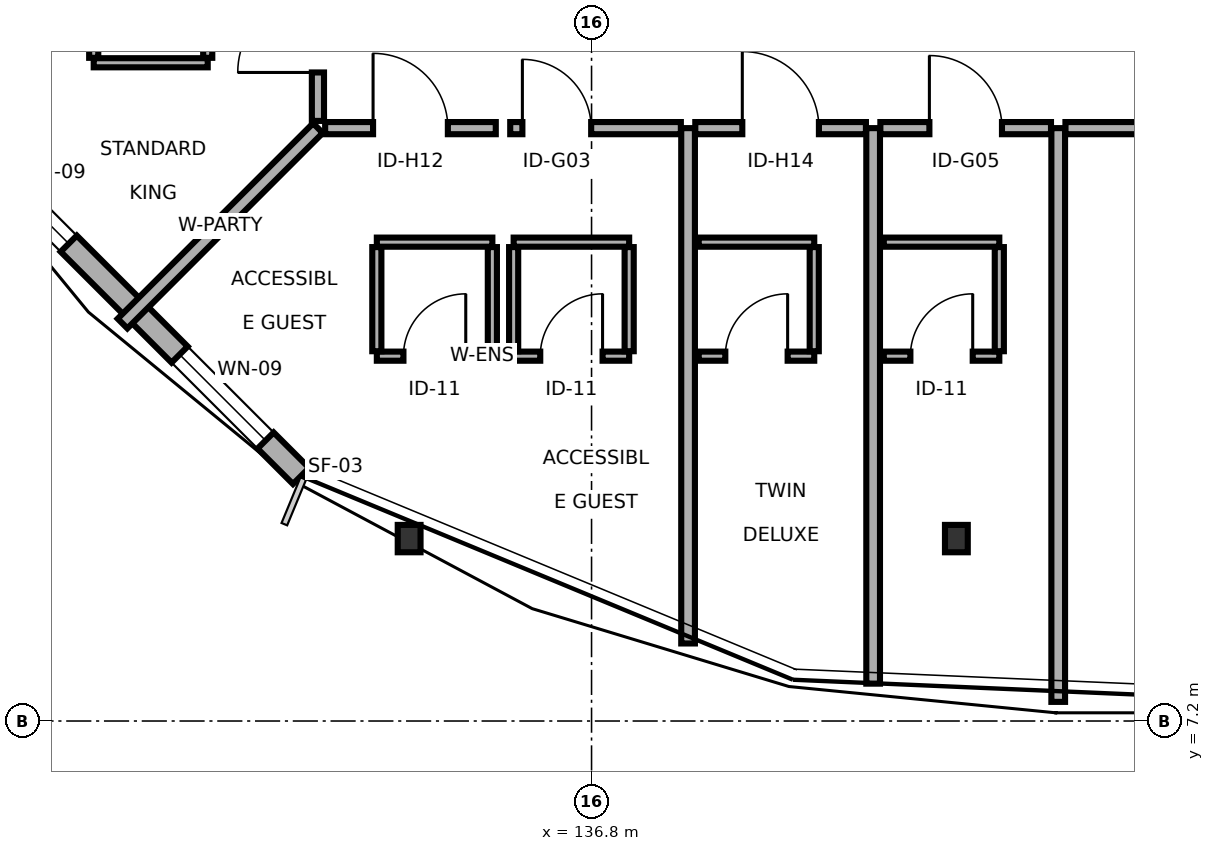
"""IFC4 building model, lengths in metres.
Left out: names, types, materials, properties, quantities, classifications, styles, units other than length and angle.
Written with IfcOpenShell. Run it as: python <this file> out.ifc"""

import sys

from ifc_helpers import new_model, si_unit, direction, frame, frame_2d, origin, origin_2d, place, context, subcontext, project, spatial, rectangle, i_section, extrude, element, fill, save


model = new_model("IFC4")
c1 = context("Model", 3, precision=1e-05, world=origin(), true_north=direction((0.0, 1.0)))
c2 = subcontext(c1, "Body", "Model", "MODEL_VIEW")
j1 = project(units=[si_unit("LENGTHUNIT", "METRE"), si_unit("PLANEANGLEUNIT", "RADIAN")], contexts=[c1])
p1 = place(None, origin())
s1 = spatial("IfcSite", under=j1, at=p1, CompositionType="ELEMENT")
p2 = place(p1, origin())
s2 = spatial("IfcBuilding", under=s1, at=p2, CompositionType="ELEMENT")
p3 = place(p2, frame((0.0, 0.0, 35.1)))
s3 = spatial("IfcBuildingStorey", under=s2, at=p3, CompositionType="ELEMENT", Elevation=35.1)
for number, where, z_axis, x_axis in (
    (1, (134.4, 9.6, 0.0), (0.0, 0.0, 1.0), (1.0, 0.0, 0.0)),
    (2, (141.6, 9.6, 0.0), (0.0, 0.0, 1.0), (1.0, 0.0, 0.0)),
):
    element("IfcColumn", number, at=place(p3, frame(where, z_axis=z_axis, x_axis=x_axis)), inside=s3, PredefinedType="COLUMN", context=c2, shape_type="SweptSolid", body=[
        extrude(i_section(OverallWidth=0.3, OverallDepth=0.36, WebThickness=0.012, FlangeThickness=0.022, FilletRadius=0.027, at=origin_2d()), origin(), (0.0, 0.0, 1.0), 3.4),
    ])
p4 = place(p3, frame((128.024, 15.378, 0.0), z_axis=(0.0, 0.0, 1.0), x_axis=(0.707124205549, -0.707089356394, 0.0)))
e3 = element("IfcWall", 3, at=p4, inside=s3, PredefinedType="SOLIDWALL", context=c2, shape_type="SweptSolid", body=[
    extrude(rectangle(XDim=7.006, YDim=0.3, at=frame_2d((3.503, 0.0))), origin(), (0.0, 0.0, 1.0), 3.165),
])
p5 = place(p4, frame((4.746, 0.0, 0.8)))
e4 = element("IfcOpeningElement", 4, at=p5, cuts=e3, PredefinedType="OPENING", context=c2, shape_type="SweptSolid", body=[
    extrude(rectangle(XDim=1.6, YDim=1.5, at=frame_2d((0.8, 0.75))), frame((0.0, 0.16, 0.0), z_axis=(0.0, -1.0, 0.0), x_axis=(1.0, 0.0, 0.0)), (0.0, 0.0, 1.0), 0.32),
])
p6 = place(p4, frame((1.083, 0.0, 0.8)))
e5 = element("IfcOpeningElement", 5, at=p6, cuts=e3, PredefinedType="OPENING", context=c2, shape_type="SweptSolid", body=[
    extrude(rectangle(XDim=1.6, YDim=1.5, at=frame_2d((0.8, 0.75))), frame((0.0, 0.16, 0.0), z_axis=(0.0, -1.0, 0.0), x_axis=(1.0, 0.0, 0.0)), (0.0, 0.0, 1.0), 0.32),
])
p7 = place(p3, frame((143.035, 15.0, 0.0), z_axis=(0.0, 0.0, 1.0), x_axis=(1.0, 0.0, 0.0)))
e6 = element("IfcWall", 6, at=p7, inside=s3, PredefinedType="PARTITIONING", context=c2, shape_type="SweptSolid", body=[
    extrude(rectangle(XDim=4.68, YDim=0.16, at=frame_2d((2.34, 0.0))), origin(), (0.0, 0.0, 1.0), 3.165),
])
p8 = place(p7, frame((1.59, 0.0, 0.0)))
e7 = element("IfcOpeningElement", 7, at=p8, cuts=e6, PredefinedType="OPENING", context=c2, shape_type="SweptSolid", body=[
    extrude(rectangle(XDim=1.5, YDim=2.25, at=frame_2d((0.75, 1.125))), frame((0.0, 0.09, 0.0), z_axis=(0.0, -1.0, 0.0), x_axis=(1.0, 0.0, 0.0)), (0.0, 0.0, 1.0), 0.18),
])
p9 = place(p3, frame((133.295, 15.0, 0.0), z_axis=(0.0, 0.0, 1.0), x_axis=(1.0, 0.0, 0.0)))
e8 = element("IfcWall", 8, at=p9, inside=s3, PredefinedType="PARTITIONING", context=c2, shape_type="SweptSolid", body=[
    extrude(rectangle(XDim=2.245, YDim=0.16, at=frame_2d((1.123, 0.0))), origin(), (0.0, 0.0, 1.0), 3.165),
])
p10 = place(p9, frame((0.631, 0.0, 0.0)))
e9 = element("IfcOpeningElement", 9, at=p10, cuts=e8, PredefinedType="OPENING", context=c2, shape_type="SweptSolid", body=[
    extrude(rectangle(XDim=0.984, YDim=2.07, at=frame_2d((0.492, 1.035))), frame((0.0, 0.09, 0.0), z_axis=(0.0, -1.0, 0.0), x_axis=(1.0, 0.0, 0.0)), (0.0, 0.0, 1.0), 0.18),
])
p11 = place(p3, frame((133.975, 12.0, 0.0), z_axis=(0.0, 0.0, 1.0), x_axis=(1.0, 0.0, 0.0)))
e10 = element("IfcWall", 10, at=p11, inside=s3, PredefinedType="PARTITIONING", context=c2, shape_type="SweptSolid", body=[
    extrude(rectangle(XDim=1.52, YDim=0.12, at=frame_2d((0.76, 0.0))), origin(), (0.0, 0.0, 1.0), 2.75),
])
p12 = place(p11, frame((0.35, 0.0, 0.0)))
e11 = element("IfcOpeningElement", 11, at=p12, cuts=e10, PredefinedType="OPENING", context=c2, shape_type="SweptSolid", body=[
    extrude(rectangle(XDim=0.82, YDim=2.08, at=frame_2d((0.41, 1.04))), frame((0.0, 0.07, 0.0), z_axis=(0.0, -1.0, 0.0), x_axis=(1.0, 0.0, 0.0)), (0.0, 0.0, 1.0), 0.14),
])
p13 = place(p3, frame((133.975, 13.5, 0.0), z_axis=(0.0, 0.0, 1.0), x_axis=(1.0, 0.0, 0.0)))
e12 = element("IfcWall", 12, at=p13, inside=s3, PredefinedType="PARTITIONING", context=c2, shape_type="SweptSolid", body=[
    extrude(rectangle(XDim=1.52, YDim=0.12, at=frame_2d((0.76, 0.0))), origin(), (0.0, 0.0, 1.0), 3.165),
])
p14 = place(p3, frame((133.975, 12.065, 0.0), z_axis=(0.0, 0.0, 1.0), x_axis=(0.0, 1.0, 0.0)))
e13 = element("IfcWall", 13, at=p14, inside=s3, PredefinedType="PARTITIONING", context=c2, shape_type="SweptSolid", body=[
    extrude(rectangle(XDim=1.37, YDim=0.12, at=frame_2d((0.685, 0.0))), origin(), (0.0, 0.0, 1.0), 3.165),
])
p15 = place(p3, frame((135.495, 12.065, 0.0), z_axis=(0.0, 0.0, 1.0), x_axis=(0.0, 1.0, 0.0)))
e14 = element("IfcWall", 14, at=p15, inside=s3, PredefinedType="PARTITIONING", context=c2, shape_type="SweptSolid", body=[
    extrude(rectangle(XDim=1.37, YDim=0.12, at=frame_2d((0.685, 0.0))), origin(), (0.0, 0.0, 1.0), 2.75),
])
p16 = place(p3, frame((133.2, 15.0, 0.0), z_axis=(0.0, 0.0, 1.0), x_axis=(-0.707106781187, -0.707106781187, 0.0)))
e15 = element("IfcWall", 15, at=p16, inside=s3, PredefinedType="PARTITIONING", context=c2, shape_type="SweptSolid", body=[
    extrude(rectangle(XDim=3.636, YDim=0.18, at=frame_2d((1.818, 0.0))), origin(), (0.0, 0.0, 1.0), 2.65),
])
p17 = place(p3, frame((135.73, 15.0, 0.0), z_axis=(0.0, 0.0, 1.0), x_axis=(1.0, 0.0, 0.0)))
e16 = element("IfcWall", 16, at=p17, inside=s3, PredefinedType="PARTITIONING", context=c2, shape_type="SweptSolid", body=[
    extrude(rectangle(XDim=2.245, YDim=0.16, at=frame_2d((1.123, 0.0))), origin(), (0.0, 0.0, 1.0), 2.75),
])
p18 = place(p17, frame((0.16, 0.0, 0.0)))
e17 = element("IfcOpeningElement", 17, at=p18, cuts=e16, PredefinedType="OPENING", context=c2, shape_type="SweptSolid", body=[
    extrude(rectangle(XDim=0.905, YDim=2.05, at=frame_2d((0.453, 1.025))), frame((0.0, 0.09, 0.0), z_axis=(0.0, -1.0, 0.0), x_axis=(1.0, 0.0, 0.0)), (0.0, 0.0, 1.0), 0.18),
])
p19 = place(p3, frame((135.775, 12.0, 0.0), z_axis=(0.0, 0.0, 1.0), x_axis=(1.0, 0.0, 0.0)))
e18 = element("IfcWall", 18, at=p19, inside=s3, PredefinedType="PARTITIONING", context=c2, shape_type="SweptSolid", body=[
    extrude(rectangle(XDim=1.52, YDim=0.12, at=frame_2d((0.76, 0.0))), origin(), (0.0, 0.0, 1.0), 3.165),
])
p20 = place(p19, frame((0.35, 0.0, 0.0)))
e19 = element("IfcOpeningElement", 19, at=p20, cuts=e18, PredefinedType="OPENING", context=c2, shape_type="SweptSolid", body=[
    extrude(rectangle(XDim=0.82, YDim=2.08, at=frame_2d((0.41, 1.04))), frame((0.0, 0.07, 0.0), z_axis=(0.0, -1.0, 0.0), x_axis=(1.0, 0.0, 0.0)), (0.0, 0.0, 1.0), 0.14),
])
p21 = place(p3, frame((135.775, 13.5, 0.0), z_axis=(0.0, 0.0, 1.0), x_axis=(1.0, 0.0, 0.0)))
e20 = element("IfcWall", 20, at=p21, inside=s3, PredefinedType="PARTITIONING", context=c2, shape_type="SweptSolid", body=[
    extrude(rectangle(XDim=1.52, YDim=0.12, at=frame_2d((0.76, 0.0))), origin(), (0.0, 0.0, 1.0), 2.75),
])
p22 = place(p3, frame((135.775, 12.065, 0.0), z_axis=(0.0, 0.0, 1.0), x_axis=(0.0, 1.0, 0.0)))
e21 = element("IfcWall", 21, at=p22, inside=s3, PredefinedType="PARTITIONING", context=c2, shape_type="SweptSolid", body=[
    extrude(rectangle(XDim=1.37, YDim=0.12, at=frame_2d((0.685, 0.0))), origin(), (0.0, 0.0, 1.0), 2.75),
])
p23 = place(p3, frame((137.295, 12.065, 0.0), z_axis=(0.0, 0.0, 1.0), x_axis=(0.0, 1.0, 0.0)))
e22 = element("IfcWall", 22, at=p23, inside=s3, PredefinedType="PARTITIONING", context=c2, shape_type="SweptSolid", body=[
    extrude(rectangle(XDim=1.37, YDim=0.12, at=frame_2d((0.685, 0.0))), origin(), (0.0, 0.0, 1.0), 3.165),
])
p24 = place(p3, frame((138.07, 8.22, 0.0), z_axis=(0.0, 0.0, 1.0), x_axis=(0.0, 1.0, 0.0)))
e23 = element("IfcWall", 23, at=p24, inside=s3, PredefinedType="PARTITIONING", context=c2, shape_type="SweptSolid", body=[
    extrude(rectangle(XDim=6.78, YDim=0.18, at=frame_2d((3.39, 0.0))), origin(), (0.0, 0.0, 1.0), 2.65),
])
p25 = place(p3, frame((138.165, 15.0, 0.0), z_axis=(0.0, 0.0, 1.0), x_axis=(1.0, 0.0, 0.0)))
e24 = element("IfcWall", 24, at=p25, inside=s3, PredefinedType="PARTITIONING", context=c2, shape_type="SweptSolid", body=[
    extrude(rectangle(XDim=2.245, YDim=0.16, at=frame_2d((1.123, 0.0))), origin(), (0.0, 0.0, 1.0), 3.165),
])
p26 = place(p25, frame((0.618, 0.0, 0.0)))
e25 = element("IfcOpeningElement", 25, at=p26, cuts=e24, PredefinedType="OPENING", context=c2, shape_type="SweptSolid", body=[
    extrude(rectangle(XDim=1.008, YDim=2.13, at=frame_2d((0.504, 1.065))), frame((0.0, 0.09, 0.0), z_axis=(0.0, -1.0, 0.0), x_axis=(1.0, 0.0, 0.0)), (0.0, 0.0, 1.0), 0.18),
])
p27 = place(p3, frame((138.21, 12.0, 0.0), z_axis=(0.0, 0.0, 1.0), x_axis=(1.0, 0.0, 0.0)))
e26 = element("IfcWall", 26, at=p27, inside=s3, PredefinedType="PARTITIONING", context=c2, shape_type="SweptSolid", body=[
    extrude(rectangle(XDim=1.52, YDim=0.12, at=frame_2d((0.76, 0.0))), origin(), (0.0, 0.0, 1.0), 3.165),
])
p28 = place(p27, frame((0.35, 0.0, 0.0)))
e27 = element("IfcOpeningElement", 27, at=p28, cuts=e26, PredefinedType="OPENING", context=c2, shape_type="SweptSolid", body=[
    extrude(rectangle(XDim=0.82, YDim=2.08, at=frame_2d((0.41, 1.04))), frame((0.0, 0.07, 0.0), z_axis=(0.0, -1.0, 0.0), x_axis=(1.0, 0.0, 0.0)), (0.0, 0.0, 1.0), 0.14),
])
p29 = place(p3, frame((138.21, 13.5, 0.0), z_axis=(0.0, 0.0, 1.0), x_axis=(1.0, 0.0, 0.0)))
e28 = element("IfcWall", 28, at=p29, inside=s3, PredefinedType="PARTITIONING", context=c2, shape_type="SweptSolid", body=[
    extrude(rectangle(XDim=1.52, YDim=0.12, at=frame_2d((0.76, 0.0))), origin(), (0.0, 0.0, 1.0), 3.165),
])
p30 = place(p3, frame((139.73, 12.065, 0.0), z_axis=(0.0, 0.0, 1.0), x_axis=(0.0, 1.0, 0.0)))
e29 = element("IfcWall", 29, at=p30, inside=s3, PredefinedType="PARTITIONING", context=c2, shape_type="SweptSolid", body=[
    extrude(rectangle(XDim=1.37, YDim=0.12, at=frame_2d((0.685, 0.0))), origin(), (0.0, 0.0, 1.0), 3.165),
])
p31 = place(p3, frame((140.505, 7.692, 0.0), z_axis=(0.0, 0.0, 1.0), x_axis=(0.0, 1.0, 0.0)))
e30 = element("IfcWall", 30, at=p31, inside=s3, PredefinedType="PARTITIONING", context=c2, shape_type="SweptSolid", body=[
    extrude(rectangle(XDim=7.308, YDim=0.18, at=frame_2d((3.654, 0.0))), origin(), (0.0, 0.0, 1.0), 2.65),
])
p32 = place(p3, frame((140.6, 15.0, 0.0), z_axis=(0.0, 0.0, 1.0), x_axis=(1.0, 0.0, 0.0)))
e31 = element("IfcWall", 31, at=p32, inside=s3, PredefinedType="PARTITIONING", context=c2, shape_type="SweptSolid", body=[
    extrude(rectangle(XDim=2.245, YDim=0.16, at=frame_2d((1.123, 0.0))), origin(), (0.0, 0.0, 1.0), 2.75),
])
p33 = place(p32, frame((0.645, 0.0, 0.0)))
e32 = element("IfcOpeningElement", 32, at=p33, cuts=e31, PredefinedType="OPENING", context=c2, shape_type="SweptSolid", body=[
    extrude(rectangle(XDim=0.955, YDim=2.05, at=frame_2d((0.478, 1.025))), frame((0.0, 0.09, 0.0), z_axis=(0.0, -1.0, 0.0), x_axis=(1.0, 0.0, 0.0)), (0.0, 0.0, 1.0), 0.18),
])
p34 = place(p3, frame((140.645, 12.0, 0.0), z_axis=(0.0, 0.0, 1.0), x_axis=(1.0, 0.0, 0.0)))
e33 = element("IfcWall", 33, at=p34, inside=s3, PredefinedType="PARTITIONING", context=c2, shape_type="SweptSolid", body=[
    extrude(rectangle(XDim=1.52, YDim=0.12, at=frame_2d((0.76, 0.0))), origin(), (0.0, 0.0, 1.0), 2.75),
])
p35 = place(p34, frame((0.35, 0.0, 0.0)))
e34 = element("IfcOpeningElement", 34, at=p35, cuts=e33, PredefinedType="OPENING", context=c2, shape_type="SweptSolid", body=[
    extrude(rectangle(XDim=0.82, YDim=2.08, at=frame_2d((0.41, 1.04))), frame((0.0, 0.07, 0.0), z_axis=(0.0, -1.0, 0.0), x_axis=(1.0, 0.0, 0.0)), (0.0, 0.0, 1.0), 0.14),
])
p36 = place(p3, frame((140.645, 13.5, 0.0), z_axis=(0.0, 0.0, 1.0), x_axis=(1.0, 0.0, 0.0)))
e35 = element("IfcWall", 35, at=p36, inside=s3, PredefinedType="PARTITIONING", context=c2, shape_type="SweptSolid", body=[
    extrude(rectangle(XDim=1.52, YDim=0.12, at=frame_2d((0.76, 0.0))), origin(), (0.0, 0.0, 1.0), 2.75),
])
p37 = place(p3, frame((142.165, 12.065, 0.0), z_axis=(0.0, 0.0, 1.0), x_axis=(0.0, 1.0, 0.0)))
e36 = element("IfcWall", 36, at=p37, inside=s3, PredefinedType="PARTITIONING", context=c2, shape_type="SweptSolid", body=[
    extrude(rectangle(XDim=1.37, YDim=0.12, at=frame_2d((0.685, 0.0))), origin(), (0.0, 0.0, 1.0), 3.165),
])
p38 = place(p3, frame((142.94, 7.452, 0.0), z_axis=(0.0, 0.0, 1.0), x_axis=(0.0, 1.0, 0.0)))
e37 = element("IfcWall", 37, at=p38, inside=s3, PredefinedType="PARTITIONING", context=c2, shape_type="SweptSolid", body=[
    extrude(rectangle(XDim=7.548, YDim=0.18, at=frame_2d((3.774, 0.0))), origin(), (0.0, 0.0, 1.0), 2.65),
])
p39 = place(p3, frame((133.2, 15.095, 0.0), z_axis=(0.0, 0.0, 1.0), x_axis=(0.0, 1.0, 0.0)))
e38 = element("IfcWall", 38, at=p39, inside=s3, PredefinedType="PARTITIONING", context=c2, shape_type="SweptSolid", body=[
    extrude(rectangle(XDim=2.33, YDim=0.16, at=frame_2d((1.165, 0.0))), origin(), (0.0, 0.0, 1.0), 2.75),
])
p40 = place(p39, frame((0.637, 0.0, 0.0)))
e39 = element("IfcOpeningElement", 39, at=p40, cuts=e38, PredefinedType="OPENING", context=c2, shape_type="SweptSolid", body=[
    extrude(rectangle(XDim=1.055, YDim=2.05, at=frame_2d((0.527, 1.025))), frame((0.0, 0.09, 0.0), z_axis=(0.0, -1.0, 0.0), x_axis=(1.0, 0.0, 0.0)), (0.0, 0.0, 1.0), 0.18),
])
p41 = place(p3, frame((130.25, 15.86, 0.0), z_axis=(0.0, 0.0, 1.0), x_axis=(1.0, 0.0, 0.0)))
e40 = element("IfcWall", 40, at=p41, inside=s3, PredefinedType="PARTITIONING", context=c2, shape_type="SweptSolid", body=[
    extrude(rectangle(XDim=1.5, YDim=0.12, at=frame_2d((0.75, 0.0))), origin(), (0.0, 0.0, 1.0), 3.165),
])
p42 = place(p3, frame((130.25, 15.925, 0.0), z_axis=(0.0, 0.0, 1.0), x_axis=(0.0, 1.0, 0.0)))
e41 = element("IfcWall", 41, at=p42, inside=s3, PredefinedType="PARTITIONING", context=c2, shape_type="SweptSolid", body=[
    extrude(rectangle(XDim=1.39, YDim=0.12, at=frame_2d((0.695, 0.0))), origin(), (0.0, 0.0, 1.0), 2.75),
])
p43 = place(p42, frame((0.285, 0.0, 0.0)))
e42 = element("IfcOpeningElement", 42, at=p43, cuts=e41, PredefinedType="OPENING", context=c2, shape_type="SweptSolid", body=[
    extrude(rectangle(XDim=0.82, YDim=2.08, at=frame_2d((0.41, 1.04))), frame((0.0, 0.07, 0.0), z_axis=(0.0, -1.0, 0.0), x_axis=(1.0, 0.0, 0.0)), (0.0, 0.0, 1.0), 0.14),
])
p44 = place(p3, frame((131.75, 15.925, 0.0), z_axis=(0.0, 0.0, 1.0), x_axis=(0.0, 1.0, 0.0)))
e43 = element("IfcWall", 43, at=p44, inside=s3, PredefinedType="PARTITIONING", context=c2, shape_type="SweptSolid", body=[
    extrude(rectangle(XDim=1.39, YDim=0.12, at=frame_2d((0.695, 0.0))), origin(), (0.0, 0.0, 1.0), 2.75),
])
p45 = place(p5, origin())
e44 = element("IfcWindow", 44, at=p45, inside=s3, PartitioningType="SINGLE_PANEL", PredefinedType="WINDOW", context=c2, shape_type="SweptSolid", body=[
    extrude(rectangle(XDim=1.6, YDim=1.5, at=frame_2d((0.8, 0.75))), frame((0.0, 0.03, 0.0), z_axis=(0.0, -1.0, 0.0), x_axis=(1.0, 0.0, 0.0)), (0.0, 0.0, 1.0), 0.06),
])
fill(e4, e44)
p46 = place(p6, origin())
e45 = element("IfcWindow", 45, at=p46, inside=s3, PartitioningType="SINGLE_PANEL", PredefinedType="WINDOW", context=c2, shape_type="SweptSolid", body=[
    extrude(rectangle(XDim=1.6, YDim=1.5, at=frame_2d((0.8, 0.75))), frame((0.0, 0.03, 0.0), z_axis=(0.0, -1.0, 0.0), x_axis=(1.0, 0.0, 0.0)), (0.0, 0.0, 1.0), 0.06),
])
fill(e5, e45)
p47 = place(p10, origin())
e46 = element("IfcDoor", 46, at=p47, inside=s3, OperationType="SINGLE_SWING_LEFT", PredefinedType="DOOR", context=c2, shape_type="SweptSolid", body=[
    extrude(rectangle(XDim=0.984, YDim=2.07, at=frame_2d((0.492, 1.035))), frame((0.0, 0.025, 0.0), z_axis=(0.0, -1.0, 0.0), x_axis=(1.0, 0.0, 0.0)), (0.0, 0.0, 1.0), 0.05),
])
fill(e9, e46)
p48 = place(p12, origin())
e47 = element("IfcDoor", 47, at=p48, inside=s3, OperationType="SINGLE_SWING_RIGHT", PredefinedType="DOOR", context=c2, shape_type="SweptSolid", body=[
    extrude(rectangle(XDim=0.82, YDim=2.08, at=frame_2d((0.41, 1.04))), frame((0.0, 0.025, 0.0), z_axis=(0.0, -1.0, 0.0), x_axis=(1.0, 0.0, 0.0)), (0.0, 0.0, 1.0), 0.05),
])
fill(e11, e47)
p49 = place(p18, origin())
e48 = element("IfcDoor", 48, at=p49, inside=s3, OperationType="SINGLE_SWING_LEFT", PredefinedType="DOOR", context=c2, shape_type="SweptSolid", body=[
    extrude(rectangle(XDim=0.905, YDim=2.05, at=frame_2d((0.453, 1.025))), frame((0.0, 0.025, 0.0), z_axis=(0.0, -1.0, 0.0), x_axis=(1.0, 0.0, 0.0)), (0.0, 0.0, 1.0), 0.05),
])
fill(e17, e48)
p50 = place(p20, origin())
e49 = element("IfcDoor", 49, at=p50, inside=s3, OperationType="SINGLE_SWING_RIGHT", PredefinedType="DOOR", context=c2, shape_type="SweptSolid", body=[
    extrude(rectangle(XDim=0.82, YDim=2.08, at=frame_2d((0.41, 1.04))), frame((0.0, 0.025, 0.0), z_axis=(0.0, -1.0, 0.0), x_axis=(1.0, 0.0, 0.0)), (0.0, 0.0, 1.0), 0.05),
])
fill(e19, e49)
p51 = place(p26, origin())
e50 = element("IfcDoor", 50, at=p51, inside=s3, OperationType="SINGLE_SWING_LEFT", PredefinedType="DOOR", context=c2, shape_type="SweptSolid", body=[
    extrude(rectangle(XDim=1.008, YDim=2.13, at=frame_2d((0.504, 1.065))), frame((0.0, 0.025, 0.0), z_axis=(0.0, -1.0, 0.0), x_axis=(1.0, 0.0, 0.0)), (0.0, 0.0, 1.0), 0.05),
])
fill(e25, e50)
p52 = place(p28, origin())
e51 = element("IfcDoor", 51, at=p52, inside=s3, OperationType="SINGLE_SWING_RIGHT", PredefinedType="DOOR", context=c2, shape_type="SweptSolid", body=[
    extrude(rectangle(XDim=0.82, YDim=2.08, at=frame_2d((0.41, 1.04))), frame((0.0, 0.025, 0.0), z_axis=(0.0, -1.0, 0.0), x_axis=(1.0, 0.0, 0.0)), (0.0, 0.0, 1.0), 0.05),
])
fill(e27, e51)
p53 = place(p33, origin())
e52 = element("IfcDoor", 52, at=p53, inside=s3, OperationType="SINGLE_SWING_LEFT", PredefinedType="DOOR", context=c2, shape_type="SweptSolid", body=[
    extrude(rectangle(XDim=0.955, YDim=2.05, at=frame_2d((0.478, 1.025))), frame((0.0, 0.025, 0.0), z_axis=(0.0, -1.0, 0.0), x_axis=(1.0, 0.0, 0.0)), (0.0, 0.0, 1.0), 0.05),
])
fill(e32, e52)
p54 = place(p35, origin())
e53 = element("IfcDoor", 53, at=p54, inside=s3, OperationType="SINGLE_SWING_RIGHT", PredefinedType="DOOR", context=c2, shape_type="SweptSolid", body=[
    extrude(rectangle(XDim=0.82, YDim=2.08, at=frame_2d((0.41, 1.04))), frame((0.0, 0.025, 0.0), z_axis=(0.0, -1.0, 0.0), x_axis=(1.0, 0.0, 0.0)), (0.0, 0.0, 1.0), 0.05),
])
fill(e34, e53)
p55 = place(p40, origin())
e54 = element("IfcDoor", 54, at=p55, inside=s3, OperationType="SINGLE_SWING_LEFT", PredefinedType="DOOR", context=c2, shape_type="SweptSolid", body=[
    extrude(rectangle(XDim=1.055, YDim=2.05, at=frame_2d((0.527, 1.025))), frame((0.0, 0.025, 0.0), z_axis=(0.0, -1.0, 0.0), x_axis=(1.0, 0.0, 0.0)), (0.0, 0.0, 1.0), 0.05),
])
fill(e39, e54)
save(model, sys.argv[1])
